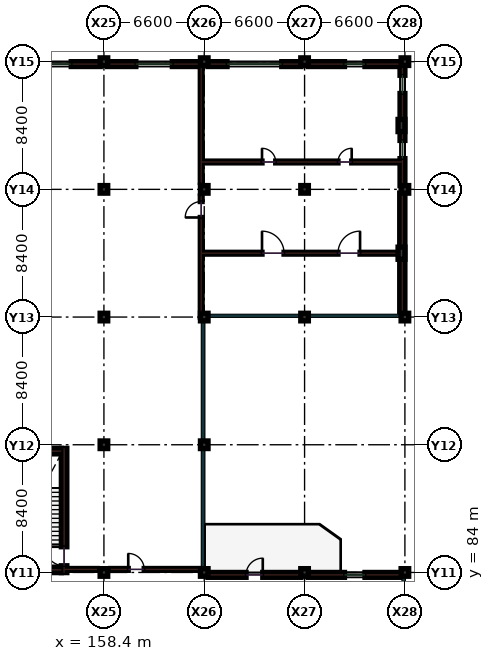
"""IFC4 building model, lengths in metres.
Left out: names, types, materials, properties, quantities, classifications, styles, units other than length and angle.
Written with IfcOpenShell. Run it as: python <this file> out.ifc"""

import sys

from ifc_helpers import new_model, si_unit, direction, frame, frame_2d, origin, origin_2d, place, context, subcontext, project, spatial, rectangle, extrude, element, fill, save


model = new_model("IFC4")
c1 = context("Model", 3, precision=1e-05, world=origin(), true_north=direction((0.0, 1.0)))
c2 = subcontext(c1, "Body", "Model", "MODEL_VIEW")
j1 = project(units=[si_unit("LENGTHUNIT", "METRE"), si_unit("PLANEANGLEUNIT", "RADIAN")], contexts=[c1])
p1 = place(None, origin())
s1 = spatial("IfcSite", under=j1, at=p1, CompositionType="ELEMENT")
p2 = place(p1, origin())
s2 = spatial("IfcBuilding", under=s1, at=p2, CompositionType="ELEMENT")
p3 = place(p2, frame((0.0, 0.0, 9.9)))
s3 = spatial("IfcBuildingStorey", under=s2, at=p3, CompositionType="ELEMENT", Elevation=9.9)
for number, where, z_axis, x_axis in (
    (1, (158.4, 84.0, 0.0), (0.0, 0.0, 1.0), (1.0, 0.0, 0.0)),
    (2, (158.4, 92.4, 0.0), (0.0, 0.0, 1.0), (1.0, 0.0, 0.0)),
    (3, (158.4, 100.8, 0.0), (0.0, 0.0, 1.0), (1.0, 0.0, 0.0)),
    (4, (158.4, 109.2, 0.0), (0.0, 0.0, 1.0), (1.0, 0.0, 0.0)),
    (5, (158.4, 117.6, 0.0), (0.0, 0.0, 1.0), (1.0, 0.0, 0.0)),
    (6, (165.0, 84.0, 0.0), (0.0, 0.0, 1.0), (1.0, 0.0, 0.0)),
    (7, (165.0, 92.4, 0.0), (0.0, 0.0, 1.0), (1.0, 0.0, 0.0)),
    (8, (165.0, 100.8, 0.0), (0.0, 0.0, 1.0), (1.0, 0.0, 0.0)),
    (9, (165.0, 109.2, 0.0), (0.0, 0.0, 1.0), (1.0, 0.0, 0.0)),
    (10, (165.0, 117.6, 0.0), (0.0, 0.0, 1.0), (1.0, 0.0, 0.0)),
    (11, (171.6, 84.0, 0.0), (0.0, 0.0, 1.0), (1.0, 0.0, 0.0)),
    (12, (171.6, 100.8, 0.0), (0.0, 0.0, 1.0), (1.0, 0.0, 0.0)),
    (13, (171.6, 109.2, 0.0), (0.0, 0.0, 1.0), (1.0, 0.0, 0.0)),
    (14, (171.6, 117.6, 0.0), (0.0, 0.0, 1.0), (1.0, 0.0, 0.0)),
    (15, (178.2, 84.0, 0.0), (0.0, 0.0, 1.0), (1.0, 0.0, 0.0)),
    (16, (178.2, 100.8, 0.0), (0.0, 0.0, 1.0), (1.0, 0.0, 0.0)),
    (17, (178.2, 109.2, 0.0), (0.0, 0.0, 1.0), (1.0, 0.0, 0.0)),
    (18, (178.2, 117.6, 0.0), (0.0, 0.0, 1.0), (1.0, 0.0, 0.0)),
):
    element("IfcColumn", number, at=place(p3, frame(where, z_axis=z_axis, x_axis=x_axis)), inside=s3, PredefinedType="COLUMN", context=c2, shape_type="SweptSolid", body=[
        extrude(rectangle(XDim=0.5, YDim=0.5, at=origin_2d()), origin(), (0.0, 0.0, 1.0), 4.5),
    ])
for number, where, z_axis, x_axis in (
    (19, (177.975, 105.0, 0.0), (0.0, 0.0, 1.0), (1.0, 0.0, 0.0)),
    (20, (177.975, 113.4, 0.0), (0.0, 0.0, 1.0), (1.0, 0.0, 0.0)),
):
    element("IfcColumn", number, at=place(p3, frame(where, z_axis=z_axis, x_axis=x_axis)), inside=s3, PredefinedType="PILASTER", context=c2, shape_type="SweptSolid", body=[
        extrude(rectangle(XDim=0.45, YDim=0.8, at=origin_2d()), origin(), (0.0, 0.0, 1.0), 4.5),
    ])
p4 = place(p3, frame((155.8, 84.2, 0.0), z_axis=(0.0, 0.0, 1.0), x_axis=(1.0, 0.0, 0.0)))
e21 = element("IfcWall", 21, at=p4, inside=s3, PredefinedType="PARTITIONING", context=c2, shape_type="SweptSolid", body=[
    extrude(rectangle(XDim=2.15, YDim=0.12, at=frame_2d((1.075, 0.0))), origin(), (0.0, 0.0, 1.0), 3.49),
])
p5 = place(p3, frame((158.85, 84.2, 0.0), z_axis=(0.0, 0.0, 1.0), x_axis=(1.0, 0.0, 0.0)))
e22 = element("IfcWall", 22, at=p5, inside=s3, PredefinedType="PARTITIONING", context=c2, shape_type="SweptSolid", body=[
    extrude(rectangle(XDim=5.83, YDim=0.12, at=frame_2d((2.915, 0.0))), origin(), (0.0, 0.0, 1.0), 3.49),
])
p6 = place(p5, frame((1.15, 0.0, 0.0)))
e23 = element("IfcOpeningElement", 23, at=p6, cuts=e22, PredefinedType="OPENING", context=c2, shape_type="SweptSolid", body=[
    extrude(rectangle(XDim=1.05, YDim=2.15, at=frame_2d((0.525, 1.075))), frame((0.0, 0.07, 0.0), z_axis=(0.0, -1.0, 0.0), x_axis=(1.0, 0.0, 0.0)), (0.0, 0.0, 1.0), 0.14),
])
p7 = place(p3, frame((164.8, 100.8, 0.0), z_axis=(0.0, 0.0, 1.0), x_axis=(0.0, 1.0, 0.0)))
e24 = element("IfcWall", 24, at=p7, inside=s3, PredefinedType="PARTITIONING", context=c2, shape_type="SweptSolid", body=[
    extrude(rectangle(XDim=7.95, YDim=0.12, at=frame_2d((3.975, 0.0))), origin(), (0.0, 0.0, 1.0), 3.49),
])
p8 = place(p7, frame((6.55, 0.0, 0.0)))
e25 = element("IfcOpeningElement", 25, at=p8, cuts=e24, PredefinedType="OPENING", context=c2, shape_type="SweptSolid", body=[
    extrude(rectangle(XDim=1.05, YDim=2.15, at=frame_2d((0.525, 1.075))), frame((0.0, 0.07, 0.0), z_axis=(0.0, -1.0, 0.0), x_axis=(1.0, 0.0, 0.0)), (0.0, 0.0, 1.0), 0.14),
])
p9 = place(p3, frame((164.8, 109.65, 0.0), z_axis=(0.0, 0.0, 1.0), x_axis=(0.0, 1.0, 0.0)))
e26 = element("IfcWall", 26, at=p9, inside=s3, PredefinedType="PARTITIONING", context=c2, shape_type="SweptSolid", body=[
    extrude(rectangle(XDim=7.63, YDim=0.12, at=frame_2d((3.815, 0.0))), origin(), (0.0, 0.0, 1.0), 3.49),
])
p10 = place(p3, frame((164.8, 105.0, 0.0), z_axis=(0.0, 0.0, 1.0), x_axis=(1.0, 0.0, 0.0)))
e27 = element("IfcWall", 27, at=p10, inside=s3, PredefinedType="PARTITIONING", context=c2, shape_type="SweptSolid", body=[
    extrude(rectangle(XDim=13.2, YDim=0.12, at=frame_2d((6.6, 0.0))), origin(), (0.0, 0.0, 1.0), 3.49),
])
p11 = place(p10, frame((4.0, 0.0, 0.0)))
e28 = element("IfcOpeningElement", 28, at=p11, cuts=e27, PredefinedType="OPENING", context=c2, shape_type="SweptSolid", body=[
    extrude(rectangle(XDim=1.45, YDim=2.25, at=frame_2d((0.725, 1.125))), frame((0.0, 0.07, 0.0), z_axis=(0.0, -1.0, 0.0), x_axis=(1.0, 0.0, 0.0)), (0.0, 0.0, 1.0), 0.14),
])
p12 = place(p10, frame((9.0, 0.0, 0.0)))
e29 = element("IfcOpeningElement", 29, at=p12, cuts=e27, PredefinedType="OPENING", context=c2, shape_type="SweptSolid", body=[
    extrude(rectangle(XDim=1.45, YDim=2.25, at=frame_2d((0.725, 1.125))), frame((0.0, 0.07, 0.0), z_axis=(0.0, -1.0, 0.0), x_axis=(1.0, 0.0, 0.0)), (0.0, 0.0, 1.0), 0.14),
])
p13 = place(p3, frame((164.8, 111.0, 0.0), z_axis=(0.0, 0.0, 1.0), x_axis=(1.0, 0.0, 0.0)))
e30 = element("IfcWall", 30, at=p13, inside=s3, PredefinedType="PARTITIONING", context=c2, shape_type="SweptSolid", body=[
    extrude(rectangle(XDim=13.2, YDim=0.12, at=frame_2d((6.6, 0.0))), origin(), (0.0, 0.0, 1.0), 3.49),
])
p14 = place(p13, frame((4.0, 0.0, 0.0)))
e31 = element("IfcOpeningElement", 31, at=p14, cuts=e30, PredefinedType="OPENING", context=c2, shape_type="SweptSolid", body=[
    extrude(rectangle(XDim=0.9, YDim=2.1, at=frame_2d((0.45, 1.05))), frame((0.0, 0.07, 0.0), z_axis=(0.0, -1.0, 0.0), x_axis=(1.0, 0.0, 0.0)), (0.0, 0.0, 1.0), 0.14),
])
p15 = place(p13, frame((9.0, 0.0, 0.0)))
e32 = element("IfcOpeningElement", 32, at=p15, cuts=e30, PredefinedType="OPENING", context=c2, shape_type="SweptSolid", body=[
    extrude(rectangle(XDim=0.9, YDim=2.1, at=frame_2d((0.45, 1.05))), frame((0.0, 0.07, 0.0), z_axis=(0.0, -1.0, 0.0), x_axis=(1.0, 0.0, 0.0)), (0.0, 0.0, 1.0), 0.14),
])
p16 = place(p3, frame((158.155, 117.44, 0.0), z_axis=(0.0, 0.0, 1.0), x_axis=(-1.0, 0.0, 0.0)))
e33 = element("IfcWall", 33, at=p16, inside=s3, PredefinedType="SOLIDWALL", context=c2, shape_type="SweptSolid", body=[
    extrude(rectangle(XDim=6.11, YDim=0.32, at=frame_2d((3.055, 0.0))), origin(), (0.0, 0.0, 1.0), 3.625),
])
p17 = place(p16, frame((1.905, 0.0, 0.95)))
e34 = element("IfcOpeningElement", 34, at=p17, cuts=e33, PredefinedType="OPENING", context=c2, shape_type="SweptSolid", body=[
    extrude(rectangle(XDim=2.3, YDim=1.95, at=frame_2d((1.15, 0.975))), frame((0.0, 0.17, 0.0), z_axis=(0.0, -1.0, 0.0), x_axis=(1.0, 0.0, 0.0)), (0.0, 0.0, 1.0), 0.34),
])
p18 = place(p3, frame((164.755, 117.44, 0.0), z_axis=(0.0, 0.0, 1.0), x_axis=(-1.0, 0.0, 0.0)))
e35 = element("IfcWall", 35, at=p18, inside=s3, PredefinedType="SOLIDWALL", context=c2, shape_type="SweptSolid", body=[
    extrude(rectangle(XDim=6.11, YDim=0.32, at=frame_2d((3.055, 0.0))), origin(), (0.0, 0.0, 1.0), 3.625),
])
p19 = place(p18, frame((1.855, 0.0, 0.95)))
e36 = element("IfcOpeningElement", 36, at=p19, cuts=e35, PredefinedType="OPENING", context=c2, shape_type="SweptSolid", body=[
    extrude(rectangle(XDim=2.4, YDim=1.6, at=frame_2d((1.2, 0.8))), frame((0.0, 0.17, 0.0), z_axis=(0.0, -1.0, 0.0), x_axis=(1.0, 0.0, 0.0)), (0.0, 0.0, 1.0), 0.34),
])
p20 = place(p3, frame((171.355, 83.84, 0.0), z_axis=(0.0, 0.0, 1.0), x_axis=(-1.0, 0.0, 0.0)))
e37 = element("IfcWall", 37, at=p20, inside=s3, PredefinedType="SOLIDWALL", context=c2, shape_type="SweptSolid", body=[
    extrude(rectangle(XDim=6.11, YDim=0.32, at=frame_2d((3.055, 0.0))), origin(), (0.0, 0.0, 1.0), 3.625),
])
p21 = place(p20, frame((2.505, 0.0, 0.0)))
e38 = element("IfcOpeningElement", 38, at=p21, cuts=e37, PredefinedType="OPENING", context=c2, shape_type="SweptSolid", body=[
    extrude(rectangle(XDim=1.1, YDim=2.2, at=frame_2d((0.55, 1.1))), frame((0.0, 0.17, 0.0), z_axis=(0.0, -1.0, 0.0), x_axis=(1.0, 0.0, 0.0)), (0.0, 0.0, 1.0), 0.34),
])
p22 = place(p3, frame((171.355, 117.44, 0.0), z_axis=(0.0, 0.0, 1.0), x_axis=(-1.0, 0.0, 0.0)))
e39 = element("IfcWall", 39, at=p22, inside=s3, PredefinedType="SOLIDWALL", context=c2, shape_type="SweptSolid", body=[
    extrude(rectangle(XDim=6.11, YDim=0.32, at=frame_2d((3.055, 0.0))), origin(), (0.0, 0.0, 1.0), 3.625),
])
p23 = place(p22, frame((1.255, 0.0, 0.95)))
e40 = element("IfcOpeningElement", 40, at=p23, cuts=e39, PredefinedType="OPENING", context=c2, shape_type="SweptSolid", body=[
    extrude(rectangle(XDim=3.6, YDim=2.0, at=frame_2d((1.8, 1.0))), frame((0.0, 0.17, 0.0), z_axis=(0.0, -1.0, 0.0), x_axis=(1.0, 0.0, 0.0)), (0.0, 0.0, 1.0), 0.34),
])
p24 = place(p3, frame((177.955, 83.84, 0.0), z_axis=(0.0, 0.0, 1.0), x_axis=(-1.0, 0.0, 0.0)))
e41 = element("IfcWall", 41, at=p24, inside=s3, PredefinedType="SOLIDWALL", context=c2, shape_type="SweptSolid", body=[
    extrude(rectangle(XDim=6.11, YDim=0.32, at=frame_2d((3.055, 0.0))), origin(), (0.0, 0.0, 1.0), 3.625),
])
p25 = place(p24, frame((2.38, 0.0, 0.95)))
e42 = element("IfcOpeningElement", 42, at=p25, cuts=e41, PredefinedType="OPENING", context=c2, shape_type="SweptSolid", body=[
    extrude(rectangle(XDim=1.35, YDim=1.55, at=frame_2d((0.675, 0.775))), frame((0.0, 0.17, 0.0), z_axis=(0.0, -1.0, 0.0), x_axis=(1.0, 0.0, 0.0)), (0.0, 0.0, 1.0), 0.34),
])
p26 = place(p3, frame((178.03, 101.045, 0.0), z_axis=(0.0, 0.0, 1.0), x_axis=(0.0, 1.0, 0.0)))
e43 = element("IfcWall", 43, at=p26, inside=s3, PredefinedType="SHEAR", context=c2, shape_type="SweptSolid", body=[
    extrude(rectangle(XDim=7.91, YDim=0.34, at=frame_2d((3.955, 0.0))), origin(), (0.0, 0.0, 1.0), 4.24),
])
p27 = place(p3, frame((178.04, 109.445, 0.0), z_axis=(0.0, 0.0, 1.0), x_axis=(0.0, 1.0, 0.0)))
e44 = element("IfcWall", 44, at=p27, inside=s3, PredefinedType="SOLIDWALL", context=c2, shape_type="SweptSolid", body=[
    extrude(rectangle(XDim=7.91, YDim=0.32, at=frame_2d((3.955, 0.0))), origin(), (0.0, 0.0, 1.0), 3.625),
])
p28 = place(p27, frame((1.775, 0.0, 0.95)))
e45 = element("IfcOpeningElement", 45, at=p28, cuts=e44, PredefinedType="OPENING", context=c2, shape_type="SweptSolid", body=[
    extrude(rectangle(XDim=1.2, YDim=1.5, at=frame_2d((0.6, 0.75))), frame((0.0, 0.17, 0.0), z_axis=(0.0, -1.0, 0.0), x_axis=(1.0, 0.0, 0.0)), (0.0, 0.0, 1.0), 0.34),
])
p29 = place(p27, frame((6.06, 0.0, 0.95)))
e46 = element("IfcOpeningElement", 46, at=p29, cuts=e44, PredefinedType="OPENING", context=c2, shape_type="SweptSolid", body=[
    extrude(rectangle(XDim=1.2, YDim=1.5, at=frame_2d((0.6, 0.75))), frame((0.0, 0.17, 0.0), z_axis=(0.0, -1.0, 0.0), x_axis=(1.0, 0.0, 0.0)), (0.0, 0.0, 1.0), 0.34),
])
p30 = place(p3, frame((177.955, 117.44, 0.0), z_axis=(0.0, 0.0, 1.0), x_axis=(-1.0, 0.0, 0.0)))
e47 = element("IfcWall", 47, at=p30, inside=s3, PredefinedType="SOLIDWALL", context=c2, shape_type="SweptSolid", body=[
    extrude(rectangle(XDim=6.11, YDim=0.32, at=frame_2d((3.055, 0.0))), origin(), (0.0, 0.0, 1.0), 3.625),
])
p31 = place(p30, frame((2.38, 0.0, 0.95)))
e48 = element("IfcOpeningElement", 48, at=p31, cuts=e47, PredefinedType="OPENING", context=c2, shape_type="SweptSolid", body=[
    extrude(rectangle(XDim=1.35, YDim=1.55, at=frame_2d((0.675, 0.775))), frame((0.0, 0.17, 0.0), z_axis=(0.0, -1.0, 0.0), x_axis=(1.0, 0.0, 0.0)), (0.0, 0.0, 1.0), 0.34),
])
p32 = place(p3, frame((155.78, 83.99, 0.0), z_axis=(0.0, 0.0, 1.0), x_axis=(0.0, 1.0, 0.0)))
e49 = element("IfcWall", 49, at=p32, inside=s3, PredefinedType="SHEAR", context=c2, shape_type="SweptSolid", body=[
    extrude(rectangle(XDim=8.17, YDim=0.36, at=frame_2d((4.085, 0.0))), origin(), (0.0, 0.0, 1.0), 4.24),
])
p33 = place(p32, frame((0.45, 0.0, 0.0)))
e50 = element("IfcOpeningElement", 50, at=p33, cuts=e49, PredefinedType="OPENING", context=c2, shape_type="SweptSolid", body=[
    extrude(rectangle(XDim=1.25, YDim=2.15, at=frame_2d((0.625, 1.075))), frame((0.0, 0.19, 0.0), z_axis=(0.0, -1.0, 0.0), x_axis=(1.0, 0.0, 0.0)), (0.0, 0.0, 1.0), 0.38),
])
for number, where, z_axis, x_axis in (
    (51, (152.4, 91.98, 0.0), (0.0, 0.0, 1.0), (1.0, 0.0, 0.0)),
    (52, (152.4, 84.17, 0.0), (0.0, 0.0, 1.0), (1.0, 0.0, 0.0)),
):
    element("IfcWall", number, at=place(p3, frame(where, z_axis=z_axis, x_axis=x_axis)), inside=s3, PredefinedType="SHEAR", context=c2, shape_type="SweptSolid", body=[
        extrude(rectangle(XDim=3.2, YDim=0.36, at=frame_2d((1.6, 0.0))), origin(), (0.0, 0.0, 1.0), 4.24),
    ])
p34 = place(p6, origin())
e53 = element("IfcDoor", 53, at=p34, inside=s3, OperationType="SINGLE_SWING_LEFT", PredefinedType="DOOR", context=c2, shape_type="SweptSolid", body=[
    extrude(rectangle(XDim=1.05, YDim=2.15, at=frame_2d((0.525, 1.075))), frame((0.0, 0.025, 0.0), z_axis=(0.0, -1.0, 0.0), x_axis=(1.0, 0.0, 0.0)), (0.0, 0.0, 1.0), 0.05),
])
fill(e23, e53)
p35 = place(p8, origin())
e54 = element("IfcDoor", 54, at=p35, inside=s3, OperationType="SINGLE_SWING_LEFT", PredefinedType="DOOR", context=c2, shape_type="SweptSolid", body=[
    extrude(rectangle(XDim=1.05, YDim=2.15, at=frame_2d((0.525, 1.075))), frame((0.0, 0.025, 0.0), z_axis=(0.0, -1.0, 0.0), x_axis=(1.0, 0.0, 0.0)), (0.0, 0.0, 1.0), 0.05),
])
fill(e25, e54)
p36 = place(p11, origin())
e55 = element("IfcDoor", 55, at=p36, inside=s3, OperationType="SINGLE_SWING_LEFT", PredefinedType="DOOR", context=c2, shape_type="SweptSolid", body=[
    extrude(rectangle(XDim=1.45, YDim=2.25, at=frame_2d((0.725, 1.125))), frame((0.0, 0.025, 0.0), z_axis=(0.0, -1.0, 0.0), x_axis=(1.0, 0.0, 0.0)), (0.0, 0.0, 1.0), 0.05),
])
fill(e28, e55)
p37 = place(p12, origin())
e56 = element("IfcDoor", 56, at=p37, inside=s3, OperationType="SINGLE_SWING_RIGHT", PredefinedType="DOOR", context=c2, shape_type="SweptSolid", body=[
    extrude(rectangle(XDim=1.45, YDim=2.25, at=frame_2d((0.725, 1.125))), frame((0.0, 0.025, 0.0), z_axis=(0.0, -1.0, 0.0), x_axis=(1.0, 0.0, 0.0)), (0.0, 0.0, 1.0), 0.05),
])
fill(e29, e56)
p38 = place(p14, origin())
e57 = element("IfcDoor", 57, at=p38, inside=s3, OperationType="SINGLE_SWING_LEFT", PredefinedType="DOOR", context=c2, shape_type="SweptSolid", body=[
    extrude(rectangle(XDim=0.9, YDim=2.1, at=frame_2d((0.45, 1.05))), frame((0.0, 0.025, 0.0), z_axis=(0.0, -1.0, 0.0), x_axis=(1.0, 0.0, 0.0)), (0.0, 0.0, 1.0), 0.05),
])
fill(e31, e57)
p39 = place(p15, origin())
e58 = element("IfcDoor", 58, at=p39, inside=s3, OperationType="SINGLE_SWING_RIGHT", PredefinedType="DOOR", context=c2, shape_type="SweptSolid", body=[
    extrude(rectangle(XDim=0.9, YDim=2.1, at=frame_2d((0.45, 1.05))), frame((0.0, 0.025, 0.0), z_axis=(0.0, -1.0, 0.0), x_axis=(1.0, 0.0, 0.0)), (0.0, 0.0, 1.0), 0.05),
])
fill(e32, e58)
p40 = place(p17, origin())
e59 = element("IfcWindow", 59, at=p40, inside=s3, PartitioningType="SINGLE_PANEL", PredefinedType="WINDOW", context=c2, shape_type="SweptSolid", body=[
    extrude(rectangle(XDim=2.3, YDim=1.95, at=frame_2d((1.15, 0.975))), frame((0.0, 0.03, 0.0), z_axis=(0.0, -1.0, 0.0), x_axis=(1.0, 0.0, 0.0)), (0.0, 0.0, 1.0), 0.06),
])
fill(e34, e59)
p41 = place(p19, origin())
e60 = element("IfcWindow", 60, at=p41, inside=s3, PartitioningType="SINGLE_PANEL", PredefinedType="WINDOW", context=c2, shape_type="SweptSolid", body=[
    extrude(rectangle(XDim=2.4, YDim=1.6, at=frame_2d((1.2, 0.8))), frame((0.0, 0.03, 0.0), z_axis=(0.0, -1.0, 0.0), x_axis=(1.0, 0.0, 0.0)), (0.0, 0.0, 1.0), 0.06),
])
fill(e36, e60)
p42 = place(p21, frame((1.1, 0.0, 0.0), z_axis=(0.0, 0.0, 1.0), x_axis=(-1.0, 0.0, 0.0)))
e61 = element("IfcDoor", 61, at=p42, inside=s3, OperationType="SINGLE_SWING_LEFT", PredefinedType="DOOR", context=c2, shape_type="SweptSolid", body=[
    extrude(rectangle(XDim=1.1, YDim=2.2, at=frame_2d((0.55, 1.1))), frame((0.0, 0.025, 0.0), z_axis=(0.0, -1.0, 0.0), x_axis=(1.0, 0.0, 0.0)), (0.0, 0.0, 1.0), 0.05),
])
fill(e38, e61)
p43 = place(p23, origin())
e62 = element("IfcWindow", 62, at=p43, inside=s3, PartitioningType="SINGLE_PANEL", PredefinedType="WINDOW", context=c2, shape_type="SweptSolid", body=[
    extrude(rectangle(XDim=3.6, YDim=2.0, at=frame_2d((1.8, 1.0))), frame((0.0, 0.03, 0.0), z_axis=(0.0, -1.0, 0.0), x_axis=(1.0, 0.0, 0.0)), (0.0, 0.0, 1.0), 0.06),
])
fill(e40, e62)
p44 = place(p25, origin())
e63 = element("IfcWindow", 63, at=p44, inside=s3, PartitioningType="SINGLE_PANEL", PredefinedType="WINDOW", context=c2, shape_type="SweptSolid", body=[
    extrude(rectangle(XDim=1.35, YDim=1.55, at=frame_2d((0.675, 0.775))), frame((0.0, 0.03, 0.0), z_axis=(0.0, -1.0, 0.0), x_axis=(1.0, 0.0, 0.0)), (0.0, 0.0, 1.0), 0.06),
])
fill(e42, e63)
p45 = place(p28, origin())
e64 = element("IfcWindow", 64, at=p45, inside=s3, PartitioningType="SINGLE_PANEL", PredefinedType="WINDOW", context=c2, shape_type="SweptSolid", body=[
    extrude(rectangle(XDim=1.2, YDim=1.5, at=frame_2d((0.6, 0.75))), frame((0.0, 0.03, 0.0), z_axis=(0.0, -1.0, 0.0), x_axis=(1.0, 0.0, 0.0)), (0.0, 0.0, 1.0), 0.06),
])
fill(e45, e64)
p46 = place(p29, origin())
e65 = element("IfcWindow", 65, at=p46, inside=s3, PartitioningType="SINGLE_PANEL", PredefinedType="WINDOW", context=c2, shape_type="SweptSolid", body=[
    extrude(rectangle(XDim=1.2, YDim=1.5, at=frame_2d((0.6, 0.75))), frame((0.0, 0.03, 0.0), z_axis=(0.0, -1.0, 0.0), x_axis=(1.0, 0.0, 0.0)), (0.0, 0.0, 1.0), 0.06),
])
fill(e46, e65)
p47 = place(p31, origin())
e66 = element("IfcWindow", 66, at=p47, inside=s3, PartitioningType="SINGLE_PANEL", PredefinedType="WINDOW", context=c2, shape_type="SweptSolid", body=[
    extrude(rectangle(XDim=1.35, YDim=1.55, at=frame_2d((0.675, 0.775))), frame((0.0, 0.03, 0.0), z_axis=(0.0, -1.0, 0.0), x_axis=(1.0, 0.0, 0.0)), (0.0, 0.0, 1.0), 0.06),
])
fill(e48, e66)
p48 = place(p33, origin())
e67 = element("IfcDoor", 67, at=p48, inside=s3, OperationType="SINGLE_SWING_RIGHT", PredefinedType="DOOR", context=c2, shape_type="SweptSolid", body=[
    extrude(rectangle(XDim=1.25, YDim=2.15, at=frame_2d((0.625, 1.075))), frame((0.0, 0.025, 0.0), z_axis=(0.0, -1.0, 0.0), x_axis=(1.0, 0.0, 0.0)), (0.0, 0.0, 1.0), 0.05),
])
fill(e50, e67)
save(model, sys.argv[1])
